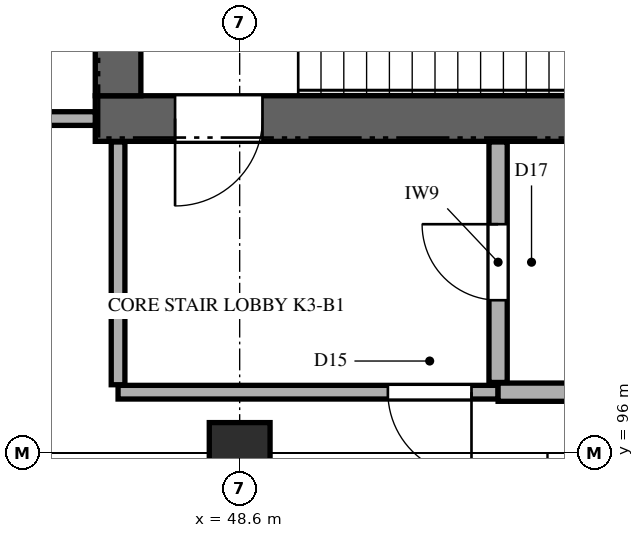
"""IFC4 building model, lengths in metres.
Left out: names, types, materials, properties, quantities, classifications, styles, units other than length and angle.
Written with IfcOpenShell. Run it as: python <this file> out.ifc"""

import sys

from ifc_helpers import new_model, si_unit, direction, frame, frame_2d, origin, origin_2d, place, context, subcontext, project, spatial, rectangle, extrude, element, fill, save


model = new_model("IFC4")
c1 = context("Model", 3, precision=1e-05, world=origin(), true_north=direction((0.0, 1.0)))
c2 = subcontext(c1, "Body", "Model", "MODEL_VIEW")
j1 = project(units=[si_unit("LENGTHUNIT", "METRE"), si_unit("PLANEANGLEUNIT", "RADIAN")], contexts=[c1])
p1 = place(None, origin())
s1 = spatial("IfcSite", under=j1, at=p1, CompositionType="ELEMENT")
p2 = place(p1, origin())
s2 = spatial("IfcBuilding", under=s1, at=p2, CompositionType="ELEMENT")
p3 = place(p2, frame((0.0, 0.0, -4.8)))
s3 = spatial("IfcBuildingStorey", under=s2, at=p3, CompositionType="ELEMENT", Elevation=-4.8)
p4 = place(p3, frame((46.7, 100.4, 0.0), z_axis=(0.0, 0.0, 1.0), x_axis=(1.0, 0.0, 0.0)))
e1 = element("IfcWall", 1, at=p4, inside=s3, PredefinedType="SHEAR", context=c2, shape_type="SweptSolid", body=[
    extrude(rectangle(XDim=15.4, YDim=0.6, at=frame_2d((7.7, 0.0))), origin(), (0.0, 0.0, 1.0), 4.8),
])
p5 = place(p4, frame((1.05, 0.0, 0.0)))
e2 = element("IfcOpeningElement", 2, at=p5, cuts=e1, PredefinedType="OPENING", context=c2, shape_type="SweptSolid", body=[
    extrude(rectangle(XDim=1.15, YDim=2.25, at=frame_2d((0.575, 1.125))), frame((0.0, 0.31, 0.0), z_axis=(0.0, -1.0, 0.0), x_axis=(1.0, 0.0, 0.0)), (0.0, 0.0, 1.0), 0.62),
])
p6 = place(p4, frame((10.333, 0.0, 0.0)))
e3 = element("IfcOpeningElement", 3, at=p6, cuts=e1, PredefinedType="OPENING", context=c2, shape_type="SweptSolid", body=[
    extrude(rectangle(XDim=1.1, YDim=2.2, at=frame_2d((0.55, 1.1))), frame((0.0, 0.31, 0.0), z_axis=(0.0, -1.0, 0.0), x_axis=(1.0, 0.0, 0.0)), (0.0, 0.0, 1.0), 0.62),
])
p7 = place(p4, frame((13.048, 0.0, 0.0)))
e4 = element("IfcOpeningElement", 4, at=p7, cuts=e1, PredefinedType="OPENING", context=c2, shape_type="SweptSolid", body=[
    extrude(rectangle(XDim=1.1, YDim=2.2, at=frame_2d((0.55, 1.1))), frame((0.0, 0.31, 0.0), z_axis=(0.0, -1.0, 0.0), x_axis=(1.0, 0.0, 0.0)), (0.0, 0.0, 1.0), 0.62),
])
p8 = place(p3, frame((47.0, 100.7, 0.0), z_axis=(0.0, 0.0, 1.0), x_axis=(0.0, 1.0, 0.0)))
e5 = element("IfcWall", 5, at=p8, inside=s3, PredefinedType="SHEAR", context=c2, shape_type="SweptSolid", body=[
    extrude(rectangle(XDim=7.8, YDim=0.6, at=frame_2d((3.9, 0.0))), origin(), (0.0, 0.0, 1.0), 4.8),
])
p9 = place(p3, frame((48.6, 96.0, 0.0), z_axis=(0.0, 0.0, 1.0), x_axis=(1.0, 0.0, 0.0)))
e6 = element("IfcColumn", 6, at=p9, inside=s3, PredefinedType="COLUMN", context=c2, shape_type="SweptSolid", body=[
    extrude(rectangle(XDim=0.8, YDim=0.8, at=origin_2d()), origin(), (0.0, 0.0, 1.0), 4.8),
])
p10 = place(p3, frame((40.967, 100.4, 0.0), z_axis=(0.0, 0.0, 1.0), x_axis=(1.0, 0.0, 0.0)))
e7 = element("IfcWall", 7, at=p10, inside=s3, PredefinedType="PARTITIONING", context=c2, shape_type="SweptSolid", body=[
    extrude(rectangle(XDim=5.733, YDim=0.18, at=frame_2d((2.867, 0.0))), origin(), (0.0, 0.0, 1.0), 4.45),
])
p11 = place(p3, frame((47.0, 96.8, 0.0), z_axis=(0.0, 0.0, 1.0), x_axis=(1.0, 0.0, 0.0)))
e8 = element("IfcWall", 8, at=p11, inside=s3, PredefinedType="PARTITIONING", context=c2, shape_type="SweptSolid", body=[
    extrude(rectangle(XDim=5.0, YDim=0.18, at=frame_2d((2.5, 0.0))), origin(), (0.0, 0.0, 1.0), 4.45),
])
p12 = place(p11, frame((3.55, 0.0, 0.0)))
e9 = element("IfcOpeningElement", 9, at=p12, cuts=e8, PredefinedType="OPENING", context=c2, shape_type="SweptSolid", body=[
    extrude(rectangle(XDim=1.1, YDim=2.2, at=frame_2d((0.55, 1.1))), frame((0.0, 0.1, 0.0), z_axis=(0.0, -1.0, 0.0), x_axis=(1.0, 0.0, 0.0)), (0.0, 0.0, 1.0), 0.2),
])
p13 = place(p3, frame((52.0, 96.8, 0.0), z_axis=(0.0, 0.0, 1.0), x_axis=(1.0, 0.0, 0.0)))
e10 = element("IfcWall", 10, at=p13, inside=s3, PredefinedType="PARTITIONING", context=c2, shape_type="SweptSolid", body=[
    extrude(rectangle(XDim=6.975, YDim=0.24, at=frame_2d((3.488, 0.0))), origin(), (0.0, 0.0, 1.0), 4.45),
])
p14 = place(p13, frame((1.771, 0.0, 0.0)))
e11 = element("IfcOpeningElement", 11, at=p14, cuts=e10, PredefinedType="OPENING", context=c2, shape_type="SweptSolid", body=[
    extrude(rectangle(XDim=1.2, YDim=2.3, at=frame_2d((0.6, 1.15))), frame((0.0, 0.13, 0.0), z_axis=(0.0, -1.0, 0.0), x_axis=(1.0, 0.0, 0.0)), (0.0, 0.0, 1.0), 0.26),
])
p15 = place(p3, frame((47.0, 96.898, 0.0), z_axis=(0.0, 0.0, 1.0), x_axis=(0.0, 1.0, 0.0)))
e12 = element("IfcWall", 12, at=p15, inside=s3, PredefinedType="PARTITIONING", context=c2, shape_type="SweptSolid", body=[
    extrude(rectangle(XDim=3.194, YDim=0.18, at=frame_2d((1.597, 0.0))), origin(), (0.0, 0.0, 1.0), 4.45),
])
p16 = place(p3, frame((52.0, 96.928, 0.0), z_axis=(0.0, 0.0, 1.0), x_axis=(0.0, 1.0, 0.0)))
e13 = element("IfcWall", 13, at=p16, inside=s3, PredefinedType="PARTITIONING", context=c2, shape_type="SweptSolid", body=[
    extrude(rectangle(XDim=3.164, YDim=0.24, at=frame_2d((1.582, 0.0))), origin(), (0.0, 0.0, 1.0), 4.45),
])
p17 = place(p16, frame((1.082, 0.0, 0.0)))
e14 = element("IfcOpeningElement", 14, at=p17, cuts=e13, PredefinedType="OPENING", context=c2, shape_type="SweptSolid", body=[
    extrude(rectangle(XDim=1.0, YDim=2.2, at=frame_2d((0.5, 1.1))), frame((0.0, 0.13, 0.0), z_axis=(0.0, -1.0, 0.0), x_axis=(1.0, 0.0, 0.0)), (0.0, 0.0, 1.0), 0.26),
])
p18 = place(p5, frame((1.15, 0.0, 0.0), z_axis=(0.0, 0.0, 1.0), x_axis=(-1.0, 0.0, 0.0)))
e15 = element("IfcDoor", 15, at=p18, inside=s3, OperationType="SINGLE_SWING_LEFT", PredefinedType="DOOR", context=c2, shape_type="SweptSolid", body=[
    extrude(rectangle(XDim=1.15, YDim=2.25, at=frame_2d((0.575, 1.125))), frame((0.0, 0.025, 0.0), z_axis=(0.0, -1.0, 0.0), x_axis=(1.0, 0.0, 0.0)), (0.0, 0.0, 1.0), 0.05),
])
fill(e2, e15)
p19 = place(p12, frame((1.1, 0.0, 0.0), z_axis=(0.0, 0.0, 1.0), x_axis=(-1.0, 0.0, 0.0)))
e16 = element("IfcDoor", 16, at=p19, inside=s3, OperationType="SINGLE_SWING_RIGHT", PredefinedType="DOOR", context=c2, shape_type="SweptSolid", body=[
    extrude(rectangle(XDim=1.1, YDim=2.2, at=frame_2d((0.55, 1.1))), frame((0.0, 0.025, 0.0), z_axis=(0.0, -1.0, 0.0), x_axis=(1.0, 0.0, 0.0)), (0.0, 0.0, 1.0), 0.05),
])
fill(e9, e16)
p20 = place(p17, origin())
e17 = element("IfcDoor", 17, at=p20, inside=s3, OperationType="SINGLE_SWING_RIGHT", PredefinedType="DOOR", context=c2, shape_type="SweptSolid", body=[
    extrude(rectangle(XDim=1.0, YDim=2.2, at=frame_2d((0.5, 1.1))), frame((0.0, 0.025, 0.0), z_axis=(0.0, -1.0, 0.0), x_axis=(1.0, 0.0, 0.0)), (0.0, 0.0, 1.0), 0.05),
])
fill(e14, e17)
save(model, sys.argv[1])
